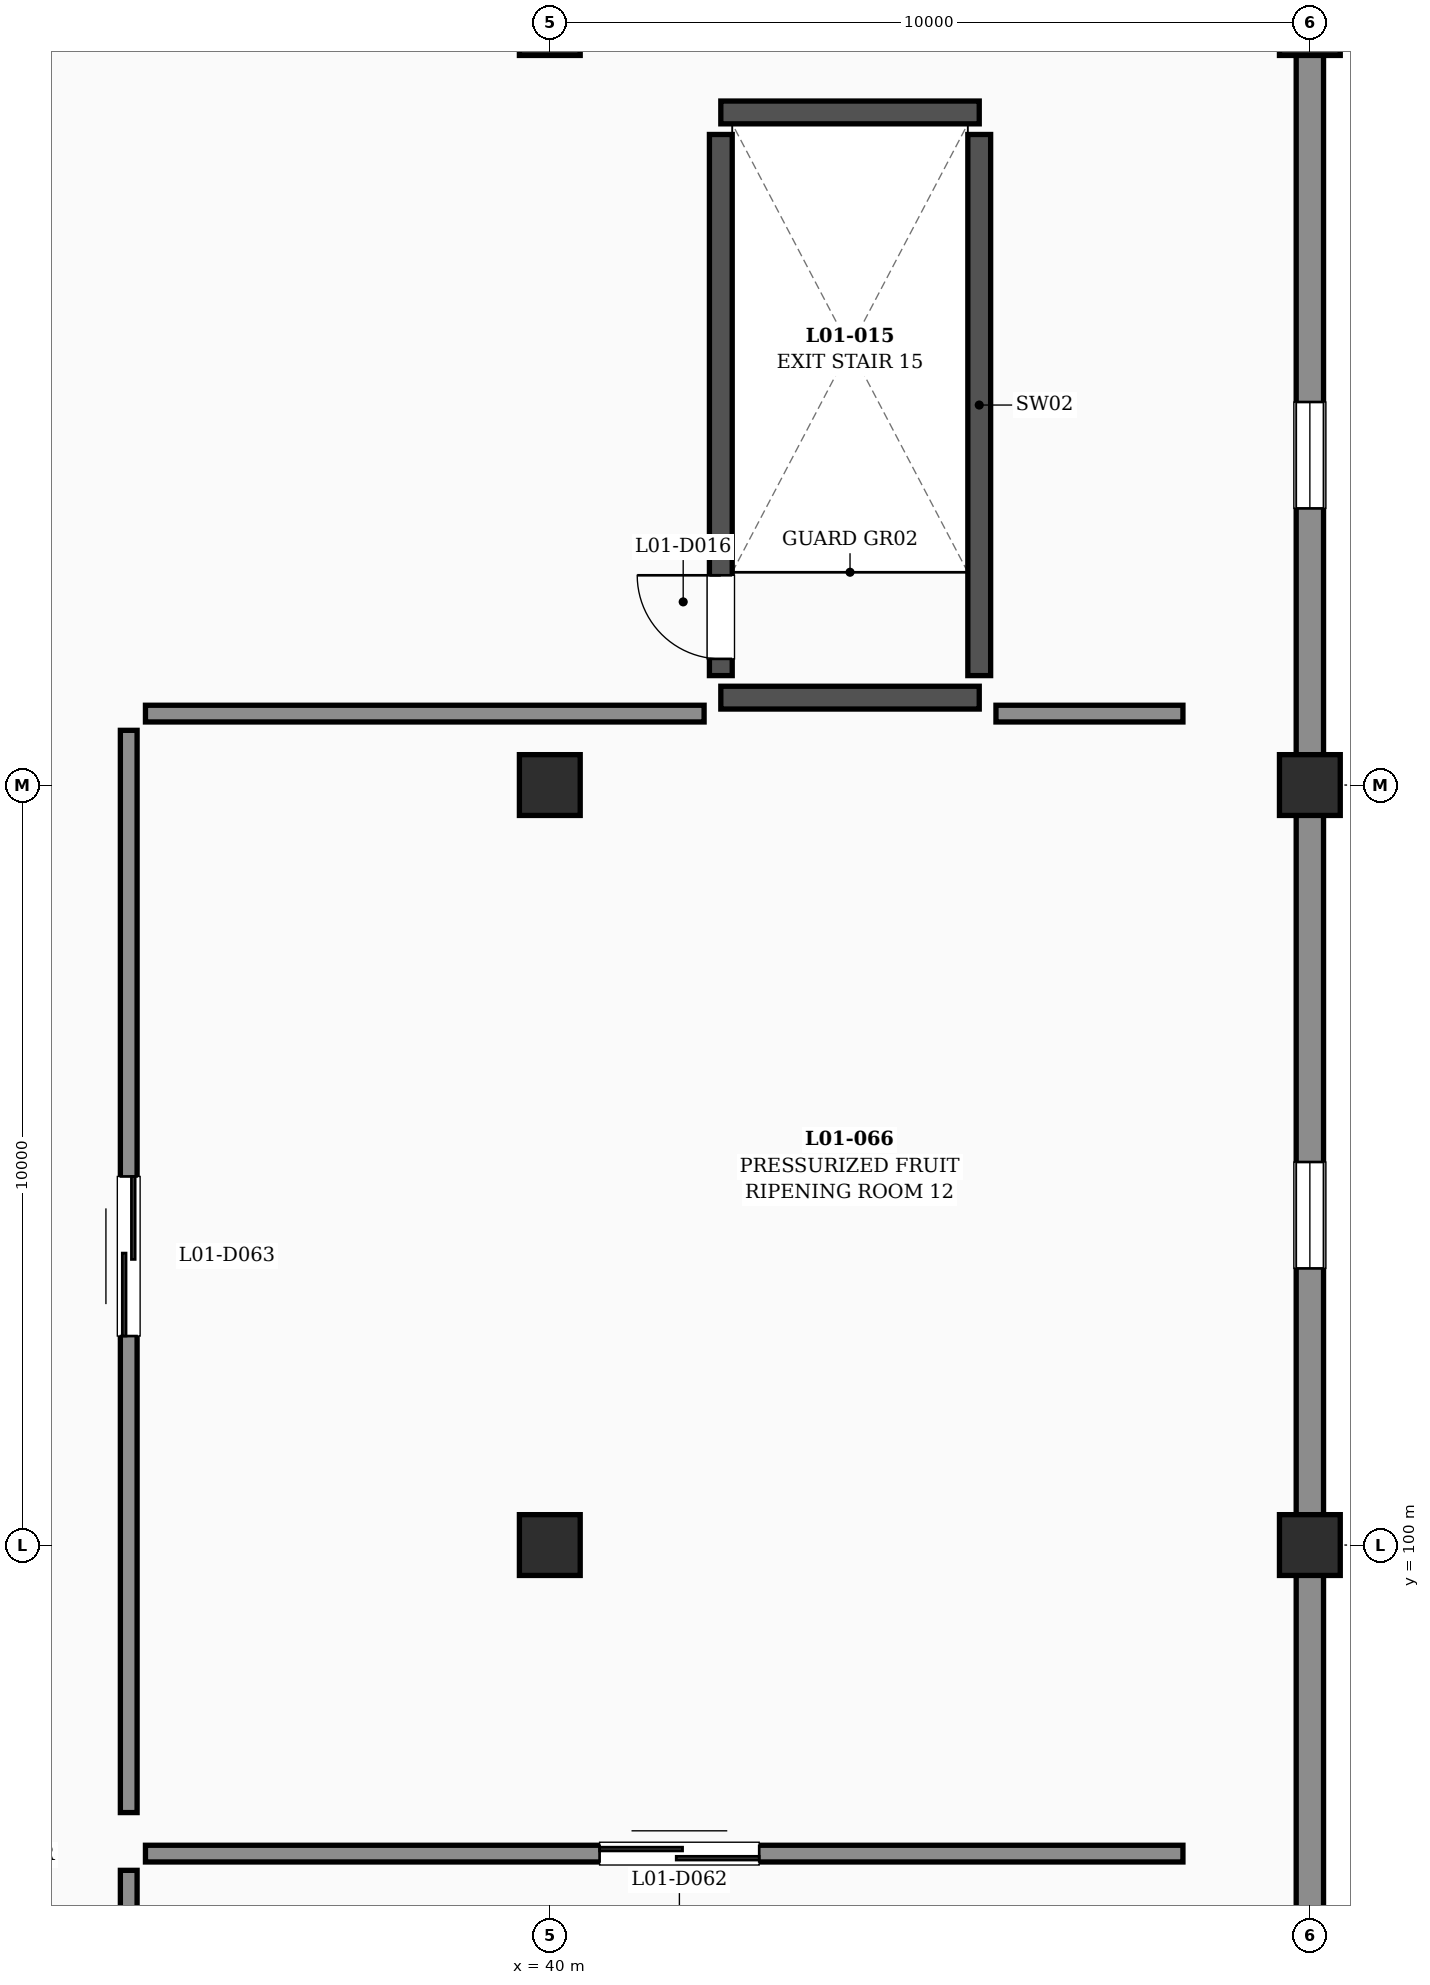
"""IFC4 building model, lengths in metres.
Left out: names, types, materials, properties, quantities, classifications, styles, units other than length and angle.
Written with IfcOpenShell. Run it as: python <this file> out.ifc"""

import sys

from ifc_helpers import new_model, si_unit, direction, frame, frame_2d, origin, origin_2d, place, context, subcontext, project, spatial, rectangle, extrude, element, fill, save


model = new_model("IFC4")
c1 = context("Model", 3, precision=1e-05, world=origin(), true_north=direction((0.0, 1.0)))
c2 = subcontext(c1, "Body", "Model", "MODEL_VIEW")
j1 = project(units=[si_unit("LENGTHUNIT", "METRE"), si_unit("PLANEANGLEUNIT", "RADIAN")], contexts=[c1])
p1 = place(None, origin())
s1 = spatial("IfcSite", under=j1, at=p1, CompositionType="ELEMENT")
p2 = place(p1, origin())
s2 = spatial("IfcBuilding", under=s1, at=p2, CompositionType="ELEMENT")
p3 = place(p2, frame((0.0, 0.0, 6.0)))
s3 = spatial("IfcBuildingStorey", under=s2, at=p3, CompositionType="ELEMENT", Elevation=6.0)
for number, where, z_axis, x_axis in (
    (1, (40.0, 100.0, 0.0), (0.0, 0.0, 1.0), (1.0, 0.0, 0.0)),
    (2, (40.0, 110.0, 0.0), (0.0, 0.0, 1.0), (1.0, 0.0, 0.0)),
    (3, (40.0, 120.0, 0.0), (0.0, 0.0, 1.0), (1.0, 0.0, 0.0)),
    (4, (50.0, 100.0, 0.0), (0.0, 0.0, 1.0), (1.0, 0.0, 0.0)),
    (5, (50.0, 110.0, 0.0), (0.0, 0.0, 1.0), (1.0, 0.0, 0.0)),
    (6, (50.0, 120.0, 0.0), (0.0, 0.0, 1.0), (1.0, 0.0, 0.0)),
):
    element("IfcColumn", number, at=place(p3, frame(where, z_axis=z_axis, x_axis=x_axis)), inside=s3, PredefinedType="COLUMN", context=c2, shape_type="SweptSolid", body=[
        extrude(rectangle(XDim=0.8, YDim=0.8, at=origin_2d()), origin(), (0.0, 0.0, 1.0), 4.8),
    ])
p4 = place(p3, frame((50.0, 90.24, 0.0), z_axis=(0.0, 0.0, 1.0), x_axis=(0.0, 1.0, 0.0)))
e7 = element("IfcWall", 7, at=p4, inside=s3, PredefinedType="SOLIDWALL", context=c2, shape_type="SweptSolid", body=[
    extrude(rectangle(XDim=9.52, YDim=0.36, at=frame_2d((4.76, 0.0))), origin(), (0.0, 0.0, 1.0), 3.61),
])
p5 = place(p4, frame((3.4, 0.0, 1.2)))
e8 = element("IfcOpeningElement", 8, at=p5, cuts=e7, PredefinedType="OPENING", context=c2, shape_type="SweptSolid", body=[
    extrude(rectangle(XDim=1.4, YDim=1.35, at=frame_2d((0.7, 0.675))), frame((0.0, 0.19, 0.0), z_axis=(0.0, -1.0, 0.0), x_axis=(1.0, 0.0, 0.0)), (0.0, 0.0, 1.0), 0.38),
])
p6 = place(p3, frame((50.0, 100.24, 0.0), z_axis=(0.0, 0.0, 1.0), x_axis=(0.0, 1.0, 0.0)))
e9 = element("IfcWall", 9, at=p6, inside=s3, PredefinedType="SOLIDWALL", context=c2, shape_type="SweptSolid", body=[
    extrude(rectangle(XDim=9.52, YDim=0.36, at=frame_2d((4.76, 0.0))), origin(), (0.0, 0.0, 1.0), 3.61),
])
p7 = place(p6, frame((3.4, 0.0, 1.2)))
e10 = element("IfcOpeningElement", 10, at=p7, cuts=e9, PredefinedType="OPENING", context=c2, shape_type="SweptSolid", body=[
    extrude(rectangle(XDim=1.4, YDim=1.35, at=frame_2d((0.7, 0.675))), frame((0.0, 0.19, 0.0), z_axis=(0.0, -1.0, 0.0), x_axis=(1.0, 0.0, 0.0)), (0.0, 0.0, 1.0), 0.38),
])
p8 = place(p3, frame((50.0, 110.24, 0.0), z_axis=(0.0, 0.0, 1.0), x_axis=(0.0, 1.0, 0.0)))
e11 = element("IfcWall", 11, at=p8, inside=s3, PredefinedType="SOLIDWALL", context=c2, shape_type="SweptSolid", body=[
    extrude(rectangle(XDim=9.52, YDim=0.36, at=frame_2d((4.76, 0.0))), origin(), (0.0, 0.0, 1.0), 3.61),
])
p9 = place(p8, frame((3.4, 0.0, 1.2)))
e12 = element("IfcOpeningElement", 12, at=p9, cuts=e11, PredefinedType="OPENING", context=c2, shape_type="SweptSolid", body=[
    extrude(rectangle(XDim=1.4, YDim=1.35, at=frame_2d((0.7, 0.675))), frame((0.0, 0.19, 0.0), z_axis=(0.0, -1.0, 0.0), x_axis=(1.0, 0.0, 0.0)), (0.0, 0.0, 1.0), 0.38),
])
for number, where, z_axis, x_axis in (
    (13, (42.25, 111.15, 0.0), (0.0, 0.0, 1.0), (1.0, 0.0, 0.0)),
    (14, (42.25, 118.85, 0.0), (0.0, 0.0, 1.0), (1.0, 0.0, 0.0)),
):
    element("IfcWall", number, at=place(p3, frame(where, z_axis=z_axis, x_axis=x_axis)), inside=s3, PredefinedType="SHEAR", context=c2, shape_type="SweptSolid", body=[
        extrude(rectangle(XDim=3.4, YDim=0.3, at=frame_2d((1.7, 0.0))), origin(), (0.0, 0.0, 1.0), 4.8),
    ])
p10 = place(p3, frame((42.25, 111.44, 0.0), z_axis=(0.0, 0.0, 1.0), x_axis=(0.0, 1.0, 0.0)))
e15 = element("IfcWall", 15, at=p10, inside=s3, PredefinedType="SHEAR", context=c2, shape_type="SweptSolid", body=[
    extrude(rectangle(XDim=7.12, YDim=0.3, at=frame_2d((3.56, 0.0))), origin(), (0.0, 0.0, 1.0), 4.8),
])
p11 = place(p10, frame((0.22, 0.0, 0.0)))
e16 = element("IfcOpeningElement", 16, at=p11, cuts=e15, PredefinedType="OPENING", context=c2, shape_type="SweptSolid", body=[
    extrude(rectangle(XDim=1.1, YDim=2.2, at=frame_2d((0.55, 1.1))), frame((0.0, 0.16, 0.0), z_axis=(0.0, -1.0, 0.0), x_axis=(1.0, 0.0, 0.0)), (0.0, 0.0, 1.0), 0.32),
])
p12 = place(p3, frame((45.65, 111.44, 0.0), z_axis=(0.0, 0.0, 1.0), x_axis=(0.0, 1.0, 0.0)))
e17 = element("IfcWall", 17, at=p12, inside=s3, PredefinedType="SHEAR", context=c2, shape_type="SweptSolid", body=[
    extrude(rectangle(XDim=7.12, YDim=0.3, at=frame_2d((3.56, 0.0))), origin(), (0.0, 0.0, 1.0), 4.8),
])
p13 = place(p3, frame((34.46, 82.48, 0.0), z_axis=(0.0, 0.0, 1.0), x_axis=(0.0, 1.0, 0.0)))
e18 = element("IfcWall", 18, at=p13, inside=s3, PredefinedType="PARTITIONING", context=c2, shape_type="SweptSolid", body=[
    extrude(rectangle(XDim=13.24, YDim=0.22, at=frame_2d((6.62, 0.0))), origin(), (0.0, 0.0, 1.0), 3.51),
])
p14 = place(p3, frame((34.68, 95.94, 0.0), z_axis=(0.0, 0.0, 1.0), x_axis=(1.0, 0.0, 0.0)))
e19 = element("IfcWall", 19, at=p14, inside=s3, PredefinedType="PARTITIONING", context=c2, shape_type="SweptSolid", body=[
    extrude(rectangle(XDim=13.65, YDim=0.22, at=frame_2d((6.825, 0.0))), origin(), (0.0, 0.0, 1.0), 3.51),
])
p15 = place(p14, frame((5.975, 0.0, 0.0)))
e20 = element("IfcOpeningElement", 20, at=p15, cuts=e19, PredefinedType="OPENING", context=c2, shape_type="SweptSolid", body=[
    extrude(rectangle(XDim=2.1, YDim=2.4, at=frame_2d((1.05, 1.2))), frame((0.0, 0.12, 0.0), z_axis=(0.0, -1.0, 0.0), x_axis=(1.0, 0.0, 0.0)), (0.0, 0.0, 1.0), 0.24),
])
p16 = place(p3, frame((34.46, 96.48, 0.0), z_axis=(0.0, 0.0, 1.0), x_axis=(0.0, 1.0, 0.0)))
e21 = element("IfcWall", 21, at=p16, inside=s3, PredefinedType="PARTITIONING", context=c2, shape_type="SweptSolid", body=[
    extrude(rectangle(XDim=14.24, YDim=0.22, at=frame_2d((7.12, 0.0))), origin(), (0.0, 0.0, 1.0), 3.51),
])
p17 = place(p16, frame((6.27, 0.0, 0.0)))
e22 = element("IfcOpeningElement", 22, at=p17, cuts=e21, PredefinedType="OPENING", context=c2, shape_type="SweptSolid", body=[
    extrude(rectangle(XDim=2.1, YDim=2.4, at=frame_2d((1.05, 1.2))), frame((0.0, 0.12, 0.0), z_axis=(0.0, -1.0, 0.0), x_axis=(1.0, 0.0, 0.0)), (0.0, 0.0, 1.0), 0.24),
])
p18 = place(p3, frame((34.68, 110.94, 0.0), z_axis=(0.0, 0.0, 1.0), x_axis=(1.0, 0.0, 0.0)))
e23 = element("IfcWall", 23, at=p18, inside=s3, PredefinedType="PARTITIONING", context=c2, shape_type="SweptSolid", body=[
    extrude(rectangle(XDim=7.35, YDim=0.22, at=frame_2d((3.675, 0.0))), origin(), (0.0, 0.0, 1.0), 3.51),
])
p19 = place(p3, frame((45.87, 110.94, 0.0), z_axis=(0.0, 0.0, 1.0), x_axis=(1.0, 0.0, 0.0)))
e24 = element("IfcWall", 24, at=p19, inside=s3, PredefinedType="PARTITIONING", context=c2, shape_type="SweptSolid", body=[
    extrude(rectangle(XDim=2.46, YDim=0.22, at=frame_2d((1.23, 0.0))), origin(), (0.0, 0.0, 1.0), 3.81),
])
p20 = place(p7, origin())
e25 = element("IfcWindow", 25, at=p20, inside=s3, PartitioningType="SINGLE_PANEL", PredefinedType="WINDOW", context=c2, shape_type="SweptSolid", body=[
    extrude(rectangle(XDim=1.4, YDim=1.35, at=frame_2d((0.7, 0.675))), frame((0.0, 0.03, 0.0), z_axis=(0.0, -1.0, 0.0), x_axis=(1.0, 0.0, 0.0)), (0.0, 0.0, 1.0), 0.06),
])
fill(e10, e25)
p21 = place(p9, origin())
e26 = element("IfcWindow", 26, at=p21, inside=s3, PartitioningType="SINGLE_PANEL", PredefinedType="WINDOW", context=c2, shape_type="SweptSolid", body=[
    extrude(rectangle(XDim=1.4, YDim=1.35, at=frame_2d((0.7, 0.675))), frame((0.0, 0.03, 0.0), z_axis=(0.0, -1.0, 0.0), x_axis=(1.0, 0.0, 0.0)), (0.0, 0.0, 1.0), 0.06),
])
fill(e12, e26)
p22 = place(p11, origin())
e27 = element("IfcDoor", 27, at=p22, inside=s3, OperationType="SINGLE_SWING_RIGHT", PredefinedType="DOOR", context=c2, shape_type="SweptSolid", body=[
    extrude(rectangle(XDim=1.1, YDim=2.2, at=frame_2d((0.55, 1.1))), frame((0.0, 0.025, 0.0), z_axis=(0.0, -1.0, 0.0), x_axis=(1.0, 0.0, 0.0)), (0.0, 0.0, 1.0), 0.05),
])
fill(e16, e27)
p23 = place(p15, origin())
e28 = element("IfcDoor", 28, at=p23, inside=s3, OperationType="DOUBLE_DOOR_SLIDING", PredefinedType="DOOR", context=c2, shape_type="SweptSolid", body=[
    extrude(rectangle(XDim=2.1, YDim=2.4, at=frame_2d((1.05, 1.2))), frame((0.0, 0.025, 0.0), z_axis=(0.0, -1.0, 0.0), x_axis=(1.0, 0.0, 0.0)), (0.0, 0.0, 1.0), 0.05),
])
fill(e20, e28)
p24 = place(p17, origin())
e29 = element("IfcDoor", 29, at=p24, inside=s3, OperationType="DOUBLE_DOOR_SLIDING", PredefinedType="DOOR", context=c2, shape_type="SweptSolid", body=[
    extrude(rectangle(XDim=2.1, YDim=2.4, at=frame_2d((1.05, 1.2))), frame((0.0, 0.025, 0.0), z_axis=(0.0, -1.0, 0.0), x_axis=(1.0, 0.0, 0.0)), (0.0, 0.0, 1.0), 0.05),
])
fill(e22, e29)
save(model, sys.argv[1])
